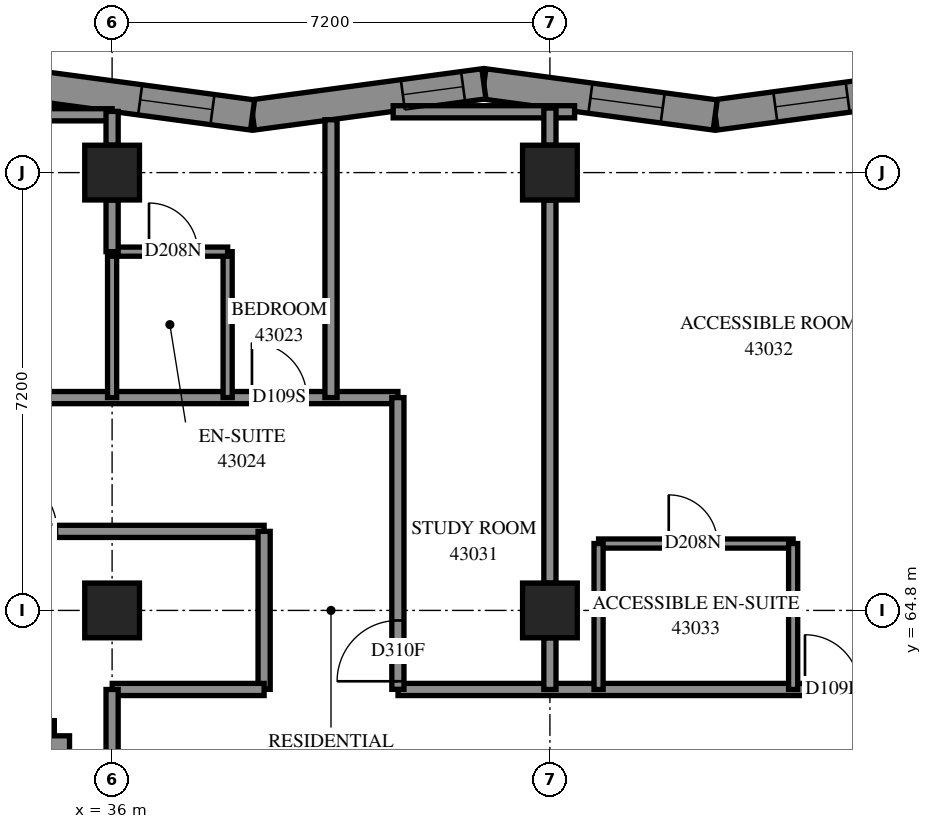
"""IFC4 building model, lengths in metres.
Left out: names, types, materials, properties, quantities, classifications, styles, units other than length and angle.
Written with IfcOpenShell. Run it as: python <this file> out.ifc"""

import sys

from ifc_helpers import new_model, si_unit, direction, frame, frame_2d, origin, origin_2d, place, context, subcontext, project, spatial, polyline, rectangle, outline, extrude, element, fill, save


model = new_model("IFC4")
c1 = context("Model", 3, precision=1e-05, world=origin(), true_north=direction((0.0, 1.0)))
c2 = subcontext(c1, "Body", "Model", "MODEL_VIEW")
j1 = project(units=[si_unit("LENGTHUNIT", "METRE"), si_unit("PLANEANGLEUNIT", "RADIAN")], contexts=[c1])
p1 = place(None, origin())
s1 = spatial("IfcSite", under=j1, at=p1, CompositionType="ELEMENT")
p2 = place(p1, origin())
s2 = spatial("IfcBuilding", under=s1, at=p2, CompositionType="ELEMENT")
p3 = place(p2, frame((0.0, 0.0, 159.2)))
s3 = spatial("IfcBuildingStorey", under=s2, at=p3, CompositionType="ELEMENT", Elevation=159.2)
for number, where, z_axis, x_axis in (
    (1, (36.0, 64.8, 0.0), (0.0, 0.0, 1.0), (1.0, 0.0, 0.0)),
    (2, (36.0, 72.0, 0.0), (0.0, 0.0, 1.0), (1.0, 0.0, 0.0)),
    (3, (43.2, 64.8, 0.0), (0.0, 0.0, 1.0), (1.0, 0.0, 0.0)),
    (4, (43.2, 72.0, 0.0), (0.0, 0.0, 1.0), (1.0, 0.0, 0.0)),
):
    element("IfcColumn", number, at=place(p3, frame(where, z_axis=z_axis, x_axis=x_axis)), inside=s3, PredefinedType="COLUMN", context=c2, shape_type="SweptSolid", body=[
        extrude(rectangle(XDim=0.9, YDim=0.9, at=origin_2d()), origin(), (0.0, 0.0, 1.0), 3.1),
    ])
p4 = place(p3, frame((49.723, 73.46, 0.0), z_axis=(0.0, 0.0, 1.0), x_axis=(-0.9910651652, -0.1333785524, 0.0)))
e5 = element("IfcWall", 5, at=p4, inside=s3, PredefinedType="SOLIDWALL", context=c2, shape_type="SweptSolid", body=[
    extrude(outline(polyline([(-0.034, -0.25), (3.805, -0.25), (3.872, 0.25), (0.034, 0.25), (-0.034, -0.25)])), origin(), (0.0, 0.0, 1.0), 3.1),
])
p5 = place(p4, frame((1.641, 0.0, 0.45)))
e6 = element("IfcOpeningElement", 6, at=p5, cuts=e5, PredefinedType="OPENING", context=c2, shape_type="SweptSolid", body=[
    extrude(rectangle(XDim=1.2, YDim=2.5, at=frame_2d((0.6, 1.25))), frame((0.0, 0.26, 0.0), z_axis=(0.0, -1.0, 0.0), x_axis=(1.0, 0.0, 0.0)), (0.0, 0.0, 1.0), 0.52),
])
p6 = place(p3, frame((45.919, 72.948, 0.0), z_axis=(0.0, 0.0, 1.0), x_axis=(-0.9910651652, 0.1333785524, 0.0)))
e7 = element("IfcWall", 7, at=p6, inside=s3, PredefinedType="SOLIDWALL", context=c2, shape_type="SweptSolid", body=[
    extrude(outline(polyline([(0.034, -0.25), (3.872, -0.25), (3.805, 0.25), (-0.034, 0.25), (0.034, -0.25)])), origin(), (0.0, 0.0, 1.0), 3.1),
])
p7 = place(p6, frame((0.872, 0.0, 0.45)))
e8 = element("IfcOpeningElement", 8, at=p7, cuts=e7, PredefinedType="OPENING", context=c2, shape_type="SweptSolid", body=[
    extrude(rectangle(XDim=1.2, YDim=2.5, at=frame_2d((0.6, 1.25))), frame((0.0, 0.26, 0.0), z_axis=(0.0, -1.0, 0.0), x_axis=(1.0, 0.0, 0.0)), (0.0, 0.0, 1.0), 0.52),
])
p8 = place(p3, frame((42.114, 73.46, 0.0), z_axis=(0.0, 0.0, 1.0), x_axis=(-0.9910647018, -0.133381996, 0.0)))
e9 = element("IfcWall", 9, at=p8, inside=s3, PredefinedType="SOLIDWALL", context=c2, shape_type="SweptSolid", body=[
    extrude(outline(polyline([(-0.034, -0.25), (3.805, -0.25), (3.872, 0.25), (0.034, 0.25), (-0.034, -0.25)])), origin(), (0.0, 0.0, 1.0), 3.1),
])
p9 = place(p8, frame((0.345, 0.0, 0.45)))
e10 = element("IfcOpeningElement", 10, at=p9, cuts=e9, PredefinedType="OPENING", context=c2, shape_type="SweptSolid", body=[
    extrude(rectangle(XDim=1.0, YDim=2.5, at=frame_2d((0.5, 1.25))), frame((0.0, 0.26, 0.0), z_axis=(0.0, -1.0, 0.0), x_axis=(1.0, 0.0, 0.0)), (0.0, 0.0, 1.0), 0.52),
])
p10 = place(p3, frame((38.31, 72.948, 0.0), z_axis=(0.0, 0.0, 1.0), x_axis=(-0.9910651652, 0.1333785524, 0.0)))
e11 = element("IfcWall", 11, at=p10, inside=s3, PredefinedType="SOLIDWALL", context=c2, shape_type="SweptSolid", body=[
    extrude(outline(polyline([(0.034, -0.25), (3.872, -0.25), (3.805, 0.25), (-0.034, 0.25), (0.034, -0.25)])), origin(), (0.0, 0.0, 1.0), 3.1),
])
p11 = place(p10, frame((0.665, 0.0, 0.45)))
e12 = element("IfcOpeningElement", 12, at=p11, cuts=e11, PredefinedType="OPENING", context=c2, shape_type="SweptSolid", body=[
    extrude(rectangle(XDim=1.2, YDim=2.5, at=frame_2d((0.6, 1.25))), frame((0.0, 0.26, 0.0), z_axis=(0.0, -1.0, 0.0), x_axis=(1.0, 0.0, 0.0)), (0.0, 0.0, 1.0), 0.52),
])
p12 = place(p3, frame((19.538, 62.738, 0.0), z_axis=(0.0, 0.0, 1.0), x_axis=(1.0, 0.0, 0.0)))
e13 = element("IfcWall", 13, at=p12, inside=s3, PredefinedType="SOLIDWALL", context=c2, shape_type="SweptSolid", body=[
    extrude(outline(polyline([(-0.25, -0.25), (15.262, -0.25), (15.762, 0.25), (0.25, 0.25), (-0.25, -0.25)])), origin(), (0.0, 0.0, 1.0), 3.1),
])
p13 = place(p12, frame((2.462, 0.0, 0.45)))
e14 = element("IfcOpeningElement", 14, at=p13, cuts=e13, PredefinedType="OPENING", context=c2, shape_type="SweptSolid", body=[
    extrude(rectangle(XDim=2.8, YDim=2.5, at=frame_2d((1.4, 1.25))), frame((0.0, 0.26, 0.0), z_axis=(0.0, -1.0, 0.0), x_axis=(1.0, 0.0, 0.0)), (0.0, 0.0, 1.0), 0.52),
])
p14 = place(p12, frame((6.062, 0.0, 0.45)))
e15 = element("IfcOpeningElement", 15, at=p14, cuts=e13, PredefinedType="OPENING", context=c2, shape_type="SweptSolid", body=[
    extrude(rectangle(XDim=2.8, YDim=2.5, at=frame_2d((1.4, 1.25))), frame((0.0, 0.26, 0.0), z_axis=(0.0, -1.0, 0.0), x_axis=(1.0, 0.0, 0.0)), (0.0, 0.0, 1.0), 0.52),
])
p15 = place(p12, frame((9.412, 0.0, 0.45)))
e16 = element("IfcOpeningElement", 16, at=p15, cuts=e13, PredefinedType="OPENING", context=c2, shape_type="SweptSolid", body=[
    extrude(rectangle(XDim=2.8, YDim=2.5, at=frame_2d((1.4, 1.25))), frame((0.0, 0.26, 0.0), z_axis=(0.0, -1.0, 0.0), x_axis=(1.0, 0.0, 0.0)), (0.0, 0.0, 1.0), 0.52),
])
p16 = place(p12, frame((0.656, 0.0, 0.45)))
e17 = element("IfcOpeningElement", 17, at=p16, cuts=e13, PredefinedType="OPENING", context=c2, shape_type="SweptSolid", body=[
    extrude(rectangle(XDim=1.2, YDim=2.5, at=frame_2d((0.6, 1.25))), frame((0.0, 0.26, 0.0), z_axis=(0.0, -1.0, 0.0), x_axis=(1.0, 0.0, 0.0)), (0.0, 0.0, 1.0), 0.52),
])
p17 = place(p12, frame((13.487, 0.0, 0.45)))
e18 = element("IfcOpeningElement", 18, at=p17, cuts=e13, PredefinedType="OPENING", context=c2, shape_type="SweptSolid", body=[
    extrude(rectangle(XDim=1.2, YDim=2.5, at=frame_2d((0.6, 1.25))), frame((0.0, 0.26, 0.0), z_axis=(0.0, -1.0, 0.0), x_axis=(1.0, 0.0, 0.0)), (0.0, 0.0, 1.0), 0.52),
])
p18 = place(p3, frame((35.05, 62.738, 0.0), z_axis=(0.0, 0.0, 1.0), x_axis=(0.0, -1.0, 0.0)))
e19 = element("IfcWall", 19, at=p18, inside=s3, PredefinedType="SOLIDWALL", context=c2, shape_type="SweptSolid", body=[
    extrude(outline(polyline([(0.25, -0.25), (6.338, -0.25), (5.838, 0.25), (-0.25, 0.25), (0.25, -0.25)])), origin(), (0.0, 0.0, 1.0), 3.1),
])
p19 = place(p18, frame((1.938, 0.0, 0.7)))
e20 = element("IfcOpeningElement", 20, at=p19, cuts=e19, PredefinedType="OPENING", context=c2, shape_type="SweptSolid", body=[
    extrude(rectangle(XDim=1.8, YDim=2.2, at=frame_2d((0.9, 1.1))), frame((0.0, 0.26, 0.0), z_axis=(0.0, -1.0, 0.0), x_axis=(1.0, 0.0, 0.0)), (0.0, 0.0, 1.0), 0.52),
])
p20 = place(p18, frame((3.938, 0.0, 0.45)))
e21 = element("IfcOpeningElement", 21, at=p20, cuts=e19, PredefinedType="OPENING", context=c2, shape_type="SweptSolid", body=[
    extrude(rectangle(XDim=0.8, YDim=2.5, at=frame_2d((0.4, 1.25))), frame((0.0, 0.26, 0.0), z_axis=(0.0, -1.0, 0.0), x_axis=(1.0, 0.0, 0.0)), (0.0, 0.0, 1.0), 0.52),
])
p21 = place(p3, frame((21.6, 68.3, 0.0), z_axis=(0.0, 0.0, 1.0), x_axis=(1.0, 0.0, 0.0)))
e22 = element("IfcWall", 22, at=p21, inside=s3, PredefinedType="PARTITIONING", context=c2, shape_type="SweptSolid", body=[
    extrude(rectangle(XDim=19.1, YDim=0.2, at=frame_2d((9.55, 0.0))), origin(), (0.0, 0.0, 1.0), 3.1),
])
p22 = place(p21, frame((3.899, 0.0, 0.0)))
e23 = element("IfcOpeningElement", 23, at=p22, cuts=e22, PredefinedType="OPENING", context=c2, shape_type="SweptSolid", body=[
    extrude(rectangle(XDim=0.9, YDim=2.1, at=frame_2d((0.45, 1.05))), frame((0.0, 0.11, 0.0), z_axis=(0.0, -1.0, 0.0), x_axis=(1.0, 0.0, 0.0)), (0.0, 0.0, 1.0), 0.22),
])
p23 = place(p21, frame((11.099, 0.0, 0.0)))
e24 = element("IfcOpeningElement", 24, at=p23, cuts=e22, PredefinedType="OPENING", context=c2, shape_type="SweptSolid", body=[
    extrude(rectangle(XDim=0.9, YDim=2.1, at=frame_2d((0.45, 1.05))), frame((0.0, 0.11, 0.0), z_axis=(0.0, -1.0, 0.0), x_axis=(1.0, 0.0, 0.0)), (0.0, 0.0, 1.0), 0.22),
])
p24 = place(p21, frame((16.7, 0.0, 0.0)))
e25 = element("IfcOpeningElement", 25, at=p24, cuts=e22, PredefinedType="OPENING", context=c2, shape_type="SweptSolid", body=[
    extrude(rectangle(XDim=0.9, YDim=2.1, at=frame_2d((0.45, 1.05))), frame((0.0, 0.11, 0.0), z_axis=(0.0, -1.0, 0.0), x_axis=(1.0, 0.0, 0.0)), (0.0, 0.0, 1.0), 0.22),
])
p25 = place(p3, frame((21.6, 66.1, 0.0), z_axis=(0.0, 0.0, 1.0), x_axis=(1.0, 0.0, 0.0)))
e26 = element("IfcWall", 26, at=p25, inside=s3, PredefinedType="PARTITIONING", context=c2, shape_type="SweptSolid", body=[
    extrude(rectangle(XDim=16.9, YDim=0.2, at=frame_2d((8.45, 0.0))), origin(), (0.0, 0.0, 1.0), 3.1),
])
p26 = place(p25, frame((12.493, 0.0, 0.0)))
e27 = element("IfcOpeningElement", 27, at=p26, cuts=e26, PredefinedType="OPENING", context=c2, shape_type="SweptSolid", body=[
    extrude(rectangle(XDim=1.0, YDim=2.1, at=frame_2d((0.5, 1.05))), frame((0.0, 0.11, 0.0), z_axis=(0.0, -1.0, 0.0), x_axis=(1.0, 0.0, 0.0)), (0.0, 0.0, 1.0), 0.22),
])
p27 = place(p3, frame((40.702, 63.5, 0.0), z_axis=(0.0, 0.0, 1.0), x_axis=(1.0, 0.0, 0.0)))
e28 = element("IfcWall", 28, at=p27, inside=s3, PredefinedType="PARTITIONING", context=c2, shape_type="SweptSolid", body=[
    extrude(rectangle(XDim=14.198, YDim=0.2, at=frame_2d((7.099, 0.0))), origin(), (0.0, 0.0, 1.0), 3.1),
])
p28 = place(p27, frame((6.692, 0.0, 0.0)))
e29 = element("IfcOpeningElement", 29, at=p28, cuts=e28, PredefinedType="OPENING", context=c2, shape_type="SweptSolid", body=[
    extrude(rectangle(XDim=0.9, YDim=2.1, at=frame_2d((0.45, 1.05))), frame((0.0, 0.11, 0.0), z_axis=(0.0, -1.0, 0.0), x_axis=(1.0, 0.0, 0.0)), (0.0, 0.0, 1.0), 0.22),
])
p29 = place(p27, frame((10.25, 0.0, 0.0)))
e30 = element("IfcOpeningElement", 30, at=p29, cuts=e28, PredefinedType="OPENING", context=c2, shape_type="SweptSolid", body=[
    extrude(rectangle(XDim=0.9, YDim=2.1, at=frame_2d((0.45, 1.05))), frame((0.0, 0.11, 0.0), z_axis=(0.0, -1.0, 0.0), x_axis=(1.0, 0.0, 0.0)), (0.0, 0.0, 1.0), 0.22),
])
p30 = place(p3, frame((43.2, 65.25, 0.0), z_axis=(0.0, 0.0, 1.0), x_axis=(0.0, 1.0, 0.0)))
e31 = element("IfcWall", 31, at=p30, inside=s3, PredefinedType="PARTITIONING", context=c2, shape_type="SweptSolid", body=[
    extrude(rectangle(XDim=6.3, YDim=0.2, at=frame_2d((3.15, 0.0))), origin(), (0.0, 0.0, 1.0), 3.1),
])
p31 = place(p3, frame((40.7, 63.502, 0.0), z_axis=(0.0, 0.0, 1.0), x_axis=(0.0, 1.0, 0.0)))
e32 = element("IfcWall", 32, at=p31, inside=s3, PredefinedType="PARTITIONING", context=c2, shape_type="SweptSolid", body=[
    extrude(rectangle(XDim=4.798, YDim=0.2, at=frame_2d((2.399, 0.0))), origin(), (0.0, 0.0, 1.0), 3.1),
])
p32 = place(p31, frame((0.133, 0.0, 0.0)))
e33 = element("IfcOpeningElement", 33, at=p32, cuts=e32, PredefinedType="OPENING", context=c2, shape_type="SweptSolid", body=[
    extrude(rectangle(XDim=1.0, YDim=2.1, at=frame_2d((0.5, 1.05))), frame((0.0, 0.11, 0.0), z_axis=(0.0, -1.0, 0.0), x_axis=(1.0, 0.0, 0.0)), (0.0, 0.0, 1.0), 0.22),
])
p33 = place(p3, frame((39.6, 68.3, 0.0), z_axis=(0.0, 0.0, 1.0), x_axis=(0.0, 1.0, 0.0)))
e34 = element("IfcWall", 34, at=p33, inside=s3, PredefinedType="PARTITIONING", context=c2, shape_type="SweptSolid", body=[
    extrude(rectangle(XDim=4.569, YDim=0.2, at=frame_2d((2.284, 0.0))), origin(), (0.0, 0.0, 1.0), 3.1),
])
p34 = place(p3, frame((44.0, 65.9, 0.0), z_axis=(0.0, 0.0, 1.0), x_axis=(1.0, 0.0, 0.0)))
e35 = element("IfcWall", 35, at=p34, inside=s3, PredefinedType="PARTITIONING", context=c2, shape_type="SweptSolid", body=[
    extrude(rectangle(XDim=3.2, YDim=0.15, at=frame_2d((1.6, 0.0))), origin(), (0.0, 0.0, 1.0), 3.1),
])
p35 = place(p34, frame((1.154, 0.0, 0.0)))
e36 = element("IfcOpeningElement", 36, at=p35, cuts=e35, PredefinedType="OPENING", context=c2, shape_type="SweptSolid", body=[
    extrude(rectangle(XDim=0.8, YDim=2.1, at=frame_2d((0.4, 1.05))), frame((0.0, 0.085, 0.0), z_axis=(0.0, -1.0, 0.0), x_axis=(1.0, 0.0, 0.0)), (0.0, 0.0, 1.0), 0.17),
])
p36 = place(p3, frame((32.648, 72.951, 0.0), z_axis=(0.0, 0.0, 1.0), x_axis=(1.0, 0.0, 0.0)))
e37 = element("IfcWall", 37, at=p36, inside=s3, PredefinedType="PARTITIONING", context=c2, shape_type="SweptSolid", body=[
    extrude(rectangle(XDim=3.352, YDim=0.2, at=frame_2d((1.676, 0.0))), origin(), (0.0, 0.0, 1.0), 3.1),
])
p37 = place(p3, frame((40.622, 73.0, 0.0), z_axis=(0.0, 0.0, 1.0), x_axis=(1.0, 0.0, 0.0)))
e38 = element("IfcWall", 38, at=p37, inside=s3, PredefinedType="PARTITIONING", context=c2, shape_type="SweptSolid", body=[
    extrude(rectangle(XDim=2.983, YDim=0.2, at=frame_2d((1.492, 0.0))), origin(), (0.0, 0.0, 1.0), 3.1),
])
p38 = place(p3, frame((38.5, 63.502, 0.0), z_axis=(0.0, 0.0, 1.0), x_axis=(0.0, 1.0, 0.0)))
e39 = element("IfcWall", 39, at=p38, inside=s3, PredefinedType="PARTITIONING", context=c2, shape_type="SweptSolid", body=[
    extrude(rectangle(XDim=2.598, YDim=0.2, at=frame_2d((1.299, 0.0))), origin(), (0.0, 0.0, 1.0), 3.1),
])
p39 = place(p3, frame((36.002, 63.5, 0.0), z_axis=(0.0, 0.0, 1.0), x_axis=(1.0, 0.0, 0.0)))
e40 = element("IfcWall", 40, at=p39, inside=s3, PredefinedType="PARTITIONING", context=c2, shape_type="SweptSolid", body=[
    extrude(rectangle(XDim=2.498, YDim=0.2, at=frame_2d((1.249, 0.0))), origin(), (0.0, 0.0, 1.0), 3.1),
])
for number, where, z_axis, x_axis in (
    (41, (37.9, 68.3, 0.0), (0.0, 0.0, 1.0), (0.0, 1.0, 0.0)),
    (42, (36.0, 68.3, 0.0), (0.0, 0.0, 1.0), (0.0, 1.0, 0.0)),
    (43, (44.0, 63.5, 0.0), (0.0, 0.0, 1.0), (0.0, 1.0, 0.0)),
    (44, (47.2, 63.5, 0.0), (0.0, 0.0, 1.0), (0.0, 1.0, 0.0)),
):
    element("IfcWall", number, at=place(p3, frame(where, z_axis=z_axis, x_axis=x_axis)), inside=s3, PredefinedType="PARTITIONING", context=c2, shape_type="SweptSolid", body=[
        extrude(rectangle(XDim=2.4, YDim=0.15, at=frame_2d((1.2, 0.0))), origin(), (0.0, 0.0, 1.0), 3.1),
    ])
p40 = place(p3, frame((36.0, 61.3, 0.0), z_axis=(0.0, 0.0, 1.0), x_axis=(0.0, 1.0, 0.0)))
e45 = element("IfcWall", 45, at=p40, inside=s3, PredefinedType="PARTITIONING", context=c2, shape_type="SweptSolid", body=[
    extrude(rectangle(XDim=2.2, YDim=0.2, at=frame_2d((1.1, 0.0))), origin(), (0.0, 0.0, 1.0), 2.6),
])
p41 = place(p3, frame((36.0, 70.7, 0.0), z_axis=(0.0, 0.0, 1.0), x_axis=(1.0, 0.0, 0.0)))
e46 = element("IfcWall", 46, at=p41, inside=s3, PredefinedType="PARTITIONING", context=c2, shape_type="SweptSolid", body=[
    extrude(rectangle(XDim=1.9, YDim=0.15, at=frame_2d((0.95, 0.0))), origin(), (0.0, 0.0, 1.0), 3.1),
])
p42 = place(p41, frame((0.607, 0.0, 0.0)))
e47 = element("IfcOpeningElement", 47, at=p42, cuts=e46, PredefinedType="OPENING", context=c2, shape_type="SweptSolid", body=[
    extrude(rectangle(XDim=0.8, YDim=2.1, at=frame_2d((0.4, 1.05))), frame((0.0, 0.085, 0.0), z_axis=(0.0, -1.0, 0.0), x_axis=(1.0, 0.0, 0.0)), (0.0, 0.0, 1.0), 0.17),
])
for number, where, z_axis, x_axis in (
    (48, (36.0, 70.7, 0.0), (0.0, 0.0, 1.0), (0.0, 1.0, 0.0)),
    (49, (43.2, 63.5, 0.0), (0.0, 0.0, 1.0), (0.0, 1.0, 0.0)),
):
    element("IfcWall", number, at=place(p3, frame(where, z_axis=z_axis, x_axis=x_axis)), inside=s3, PredefinedType="PARTITIONING", context=c2, shape_type="SweptSolid", body=[
        extrude(rectangle(XDim=0.85, YDim=0.2, at=frame_2d((0.425, 0.0))), origin(), (0.0, 0.0, 1.0), 3.1),
    ])
p43 = place(p3, frame((43.2, 72.45, 0.0), z_axis=(0.0, 0.0, 1.0), x_axis=(0.0, 1.0, 0.0)))
e50 = element("IfcWall", 50, at=p43, inside=s3, PredefinedType="PARTITIONING", context=c2, shape_type="SweptSolid", body=[
    extrude(rectangle(XDim=0.611, YDim=0.2, at=frame_2d((0.306, 0.0))), origin(), (0.0, 0.0, 1.0), 3.1),
])
p44 = place(p3, frame((36.0, 72.45, 0.0), z_axis=(0.0, 0.0, 1.0), x_axis=(0.0, 1.0, 0.0)))
e51 = element("IfcWall", 51, at=p44, inside=s3, PredefinedType="PARTITIONING", context=c2, shape_type="SweptSolid", body=[
    extrude(rectangle(XDim=0.556, YDim=0.2, at=frame_2d((0.278, 0.0))), origin(), (0.0, 0.0, 1.0), 3.1),
])
p45 = place(p5, origin())
e52 = element("IfcWindow", 52, at=p45, inside=s3, PartitioningType="SINGLE_PANEL", PredefinedType="WINDOW", context=c2, shape_type="SweptSolid", body=[
    extrude(rectangle(XDim=1.2, YDim=2.5, at=frame_2d((0.6, 1.25))), frame((0.0, 0.18, 0.0), z_axis=(0.0, -1.0, 0.0), x_axis=(1.0, 0.0, 0.0)), (0.0, 0.0, 1.0), 0.06),
])
fill(e6, e52)
p46 = place(p7, origin())
e53 = element("IfcWindow", 53, at=p46, inside=s3, PartitioningType="SINGLE_PANEL", PredefinedType="WINDOW", context=c2, shape_type="SweptSolid", body=[
    extrude(rectangle(XDim=1.2, YDim=2.5, at=frame_2d((0.6, 1.25))), frame((0.0, 0.18, 0.0), z_axis=(0.0, -1.0, 0.0), x_axis=(1.0, 0.0, 0.0)), (0.0, 0.0, 1.0), 0.06),
])
fill(e8, e53)
p47 = place(p11, origin())
e54 = element("IfcWindow", 54, at=p47, inside=s3, PartitioningType="SINGLE_PANEL", PredefinedType="WINDOW", context=c2, shape_type="SweptSolid", body=[
    extrude(rectangle(XDim=1.2, YDim=2.5, at=frame_2d((0.6, 1.25))), frame((0.0, 0.18, 0.0), z_axis=(0.0, -1.0, 0.0), x_axis=(1.0, 0.0, 0.0)), (0.0, 0.0, 1.0), 0.06),
])
fill(e12, e54)
p48 = place(p24, origin())
e55 = element("IfcDoor", 55, at=p48, inside=s3, OperationType="SINGLE_SWING_RIGHT", PredefinedType="DOOR", context=c2, shape_type="SweptSolid", body=[
    extrude(rectangle(XDim=0.9, YDim=2.1, at=frame_2d((0.45, 1.05))), frame((0.0, 0.025, 0.0), z_axis=(0.0, -1.0, 0.0), x_axis=(1.0, 0.0, 0.0)), (0.0, 0.0, 1.0), 0.05),
])
fill(e25, e55)
p49 = place(p42, origin())
e56 = element("IfcDoor", 56, at=p49, inside=s3, OperationType="SINGLE_SWING_RIGHT", PredefinedType="DOOR", context=c2, shape_type="SweptSolid", body=[
    extrude(rectangle(XDim=0.8, YDim=2.1, at=frame_2d((0.4, 1.05))), frame((0.0, 0.025, 0.0), z_axis=(0.0, -1.0, 0.0), x_axis=(1.0, 0.0, 0.0)), (0.0, 0.0, 1.0), 0.05),
])
fill(e47, e56)
p50 = place(p26, origin())
e57 = element("IfcDoor", 57, at=p50, inside=s3, OperationType="SINGLE_SWING_RIGHT", PredefinedType="DOOR", context=c2, shape_type="SweptSolid", body=[
    extrude(rectangle(XDim=1.0, YDim=2.1, at=frame_2d((0.5, 1.05))), frame((0.0, 0.025, 0.0), z_axis=(0.0, -1.0, 0.0), x_axis=(1.0, 0.0, 0.0)), (0.0, 0.0, 1.0), 0.05),
])
fill(e27, e57)
p51 = place(p32, origin())
e58 = element("IfcDoor", 58, at=p51, inside=s3, OperationType="SINGLE_SWING_LEFT", PredefinedType="DOOR", context=c2, shape_type="SweptSolid", body=[
    extrude(rectangle(XDim=1.0, YDim=2.1, at=frame_2d((0.5, 1.05))), frame((0.0, 0.025, 0.0), z_axis=(0.0, -1.0, 0.0), x_axis=(1.0, 0.0, 0.0)), (0.0, 0.0, 1.0), 0.05),
])
fill(e33, e58)
p52 = place(p28, origin())
e59 = element("IfcDoor", 59, at=p52, inside=s3, OperationType="SINGLE_SWING_RIGHT", PredefinedType="DOOR", context=c2, shape_type="SweptSolid", body=[
    extrude(rectangle(XDim=0.9, YDim=2.1, at=frame_2d((0.45, 1.05))), frame((0.0, 0.025, 0.0), z_axis=(0.0, -1.0, 0.0), x_axis=(1.0, 0.0, 0.0)), (0.0, 0.0, 1.0), 0.05),
])
fill(e29, e59)
p53 = place(p35, origin())
e60 = element("IfcDoor", 60, at=p53, inside=s3, OperationType="SINGLE_SWING_RIGHT", PredefinedType="DOOR", context=c2, shape_type="SweptSolid", body=[
    extrude(rectangle(XDim=0.8, YDim=2.1, at=frame_2d((0.4, 1.05))), frame((0.0, 0.025, 0.0), z_axis=(0.0, -1.0, 0.0), x_axis=(1.0, 0.0, 0.0)), (0.0, 0.0, 1.0), 0.05),
])
fill(e36, e60)
p54 = place(p9, origin())
e61 = element("IfcWindow", 61, at=p54, inside=s3, PartitioningType="SINGLE_PANEL", PredefinedType="WINDOW", context=c2, shape_type="SweptSolid", body=[
    extrude(rectangle(XDim=1.0, YDim=2.5, at=frame_2d((0.5, 1.25))), frame((0.0, 0.12, 0.0), z_axis=(0.0, -1.0, 0.0), x_axis=(1.0, 0.0, 0.0)), (0.0, 0.0, 1.0), 0.06),
])
fill(e10, e61)
save(model, sys.argv[1])
